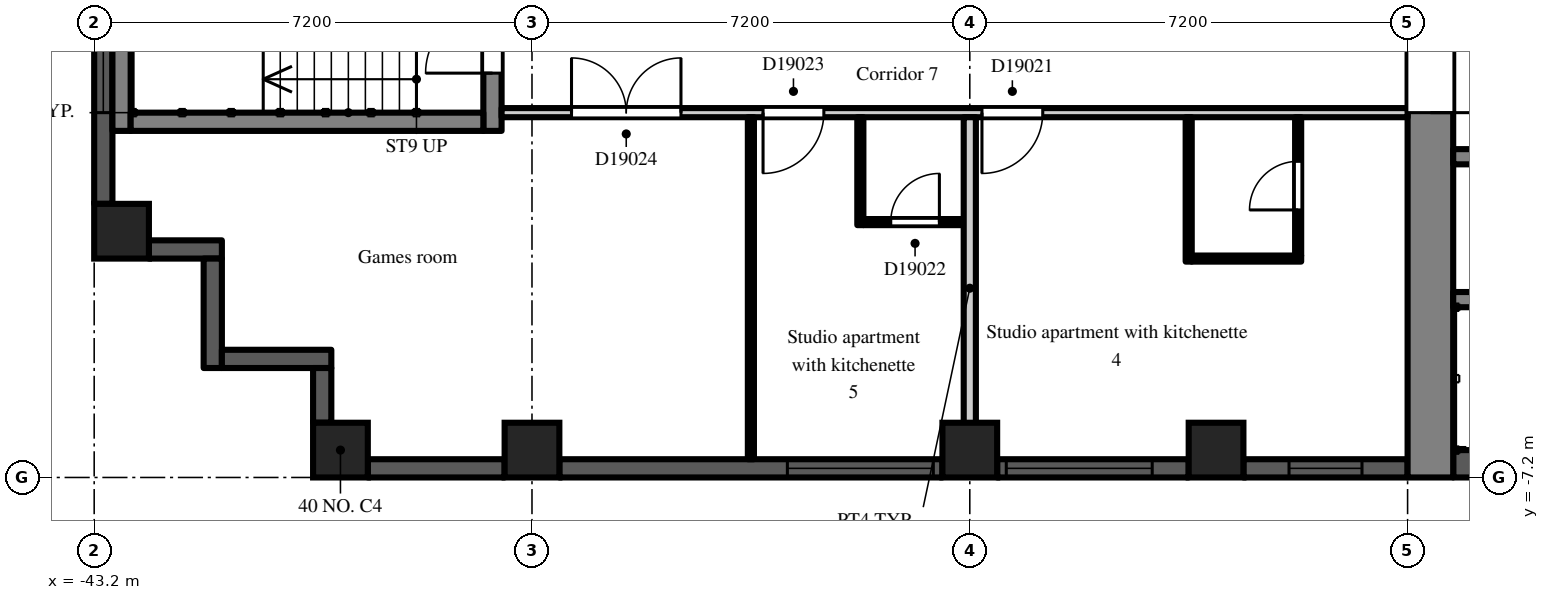
"""IFC4 building model, lengths in metres.
Left out: names, types, materials, properties, quantities, classifications, styles, units other than length and angle.
Written with IfcOpenShell. Run it as: python <this file> out.ifc"""

import sys

from ifc_helpers import new_model, si_unit, direction, frame, frame_2d, origin, origin_2d, place, context, subcontext, project, spatial, rectangle, extrude, element, fill, save


model = new_model("IFC4")
c1 = context("Model", 3, precision=1e-05, world=origin(), true_north=direction((0.0, 1.0)))
c2 = subcontext(c1, "Body", "Model", "MODEL_VIEW")
j1 = project(units=[si_unit("LENGTHUNIT", "METRE"), si_unit("PLANEANGLEUNIT", "RADIAN")], contexts=[c1])
p1 = place(None, origin())
s1 = spatial("IfcSite", under=j1, at=p1, CompositionType="ELEMENT")
p2 = place(p1, origin())
s2 = spatial("IfcBuilding", under=s1, at=p2, CompositionType="ELEMENT")
p3 = place(p2, frame((0.0, 0.0, 129.3)))
s3 = spatial("IfcBuildingStorey", under=s2, at=p3, CompositionType="ELEMENT", Elevation=129.3)
for number, where, z_axis, x_axis in (
    (1, (-42.75, -3.15, 0.0), (0.0, 0.0, 1.0), (1.0, 0.0, 0.0)),
    (2, (-39.15, -6.75, 0.0), (0.0, 0.0, 1.0), (1.0, 0.0, 0.0)),
    (3, (-36.0, -6.75, 0.0), (0.0, 0.0, 1.0), (1.0, 0.0, 0.0)),
    (4, (-28.8, -6.75, 0.0), (0.0, 0.0, 1.0), (1.0, 0.0, 0.0)),
    (5, (-24.75, -6.75, 0.0), (0.0, 0.0, 1.0), (1.0, 0.0, 0.0)),
):
    element("IfcColumn", number, at=place(p3, frame(where, z_axis=z_axis, x_axis=x_axis)), inside=s3, PredefinedType="COLUMN", context=c2, shape_type="SweptSolid", body=[
        extrude(rectangle(XDim=0.9, YDim=0.9, at=origin_2d()), origin(), (0.0, 0.0, 1.0), 3.0),
    ])
p4 = place(p3, frame((-43.05, 2.7, 0.0), z_axis=(0.0, 0.0, 1.0), x_axis=(0.0, -1.0, 0.0)))
e6 = element("IfcWall", 6, at=p4, inside=s3, PredefinedType="SOLIDWALL", context=c2, shape_type="SweptSolid", body=[
    extrude(rectangle(XDim=5.4, YDim=0.3, at=frame_2d((2.7, 0.0))), origin(), (0.0, 0.0, 1.0), 2.2),
])
p5 = place(p4, frame((1.5, 0.0, 0.2)))
e7 = element("IfcOpeningElement", 7, at=p5, cuts=e6, PredefinedType="OPENING", context=c2, shape_type="SweptSolid", body=[
    extrude(rectangle(XDim=2.4, YDim=1.85, at=frame_2d((1.2, 0.925))), frame((0.0, 0.16, 0.0), z_axis=(0.0, -1.0, 0.0), x_axis=(1.0, 0.0, 0.0)), (0.0, 0.0, 1.0), 0.32),
])
p6 = place(p4, frame((0.15, 0.0, 0.2)))
e8 = element("IfcOpeningElement", 8, at=p6, cuts=e6, PredefinedType="OPENING", context=c2, shape_type="SweptSolid", body=[
    extrude(rectangle(XDim=1.2, YDim=1.85, at=frame_2d((0.6, 0.925))), frame((0.0, 0.16, 0.0), z_axis=(0.0, -1.0, 0.0), x_axis=(1.0, 0.0, 0.0)), (0.0, 0.0, 1.0), 0.32),
])
p7 = place(p3, frame((-42.3, -3.45, 0.0), z_axis=(0.0, 0.0, 1.0), x_axis=(1.0, 0.0, 0.0)))
e9 = element("IfcWall", 9, at=p7, inside=s3, PredefinedType="SOLIDWALL", context=c2, shape_type="SweptSolid", body=[
    extrude(rectangle(XDim=1.2, YDim=0.3, at=frame_2d((0.6, 0.0))), origin(), (0.0, 0.0, 1.0), 2.6),
])
p8 = place(p3, frame((-41.25, -3.6, 0.0), z_axis=(0.0, 0.0, 1.0), x_axis=(0.0, -1.0, 0.0)))
e10 = element("IfcWall", 10, at=p8, inside=s3, PredefinedType="SOLIDWALL", context=c2, shape_type="SweptSolid", body=[
    extrude(rectangle(XDim=1.8, YDim=0.3, at=frame_2d((0.9, 0.0))), origin(), (0.0, 0.0, 1.0), 2.6),
])
p9 = place(p3, frame((-41.1, -5.25, 0.0), z_axis=(0.0, 0.0, 1.0), x_axis=(1.0, 0.0, 0.0)))
e11 = element("IfcWall", 11, at=p9, inside=s3, PredefinedType="SOLIDWALL", context=c2, shape_type="SweptSolid", body=[
    extrude(rectangle(XDim=1.8, YDim=0.3, at=frame_2d((0.9, 0.0))), origin(), (0.0, 0.0, 1.0), 2.6),
])
p10 = place(p3, frame((-39.45, -5.4, 0.0), z_axis=(0.0, 0.0, 1.0), x_axis=(0.0, -1.0, 0.0)))
e12 = element("IfcWall", 12, at=p10, inside=s3, PredefinedType="SOLIDWALL", context=c2, shape_type="SweptSolid", body=[
    extrude(rectangle(XDim=0.9, YDim=0.3, at=frame_2d((0.45, 0.0))), origin(), (0.0, 0.0, 1.0), 2.6),
])
p11 = place(p3, frame((-38.7, -7.05, 0.0), z_axis=(0.0, 0.0, 1.0), x_axis=(1.0, 0.0, 0.0)))
e13 = element("IfcWall", 13, at=p11, inside=s3, PredefinedType="SOLIDWALL", context=c2, shape_type="SweptSolid", body=[
    extrude(rectangle(XDim=2.25, YDim=0.3, at=frame_2d((1.125, 0.0))), origin(), (0.0, 0.0, 1.0), 2.2),
])
p12 = place(p3, frame((-35.55, -7.05, 0.0), z_axis=(0.0, 0.0, 1.0), x_axis=(1.0, 0.0, 0.0)))
e14 = element("IfcWall", 14, at=p12, inside=s3, PredefinedType="SOLIDWALL", context=c2, shape_type="SweptSolid", body=[
    extrude(rectangle(XDim=6.3, YDim=0.3, at=frame_2d((3.15, 0.0))), origin(), (0.0, 0.0, 1.0), 2.2),
])
p13 = place(p12, frame((3.75, 0.0, 0.2)))
e15 = element("IfcOpeningElement", 15, at=p13, cuts=e14, PredefinedType="OPENING", context=c2, shape_type="SweptSolid", body=[
    extrude(rectangle(XDim=2.4, YDim=1.85, at=frame_2d((1.2, 0.925))), frame((0.0, 0.16, 0.0), z_axis=(0.0, -1.0, 0.0), x_axis=(1.0, 0.0, 0.0)), (0.0, 0.0, 1.0), 0.32),
])
p14 = place(p3, frame((-28.35, -7.05, 0.0), z_axis=(0.0, 0.0, 1.0), x_axis=(1.0, 0.0, 0.0)))
e16 = element("IfcWall", 16, at=p14, inside=s3, PredefinedType="SOLIDWALL", context=c2, shape_type="SweptSolid", body=[
    extrude(rectangle(XDim=3.15, YDim=0.3, at=frame_2d((1.575, 0.0))), origin(), (0.0, 0.0, 1.0), 2.2),
])
p15 = place(p14, frame((0.15, 0.0, 0.2)))
e17 = element("IfcOpeningElement", 17, at=p15, cuts=e16, PredefinedType="OPENING", context=c2, shape_type="SweptSolid", body=[
    extrude(rectangle(XDim=2.4, YDim=1.85, at=frame_2d((1.2, 0.925))), frame((0.0, 0.16, 0.0), z_axis=(0.0, -1.0, 0.0), x_axis=(1.0, 0.0, 0.0)), (0.0, 0.0, 1.0), 0.32),
])
p16 = place(p3, frame((-24.3, -7.05, 0.0), z_axis=(0.0, 0.0, 1.0), x_axis=(1.0, 0.0, 0.0)))
e18 = element("IfcWall", 18, at=p16, inside=s3, PredefinedType="SOLIDWALL", context=c2, shape_type="SweptSolid", body=[
    extrude(rectangle(XDim=2.7, YDim=0.3, at=frame_2d((1.35, 0.0))), origin(), (0.0, 0.0, 1.0), 2.2),
])
p17 = place(p16, frame((0.75, 0.0, 0.2)))
e19 = element("IfcOpeningElement", 19, at=p17, cuts=e18, PredefinedType="OPENING", context=c2, shape_type="SweptSolid", body=[
    extrude(rectangle(XDim=1.2, YDim=1.85, at=frame_2d((0.6, 0.925))), frame((0.0, 0.16, 0.0), z_axis=(0.0, -1.0, 0.0), x_axis=(1.0, 0.0, 0.0)), (0.0, 0.0, 1.0), 0.32),
])
p18 = place(p3, frame((-21.225, -7.2, 0.0), z_axis=(0.0, 0.0, 1.0), x_axis=(0.0, 1.0, 0.0)))
e20 = element("IfcWall", 20, at=p18, inside=s3, PredefinedType="SHEAR", context=c2, shape_type="SweptSolid", body=[
    extrude(rectangle(XDim=14.4, YDim=0.75, at=frame_2d((7.2, 0.0))), origin(), (0.0, 0.0, 1.0), 2.6),
])
p19 = place(p18, frame((6.0, 0.0, 0.0)))
e21 = element("IfcOpeningElement", 21, at=p19, cuts=e20, PredefinedType="OPENING", context=c2, shape_type="SweptSolid", body=[
    extrude(rectangle(XDim=2.4, YDim=2.2, at=frame_2d((1.2, 1.1))), frame((0.0, 0.385, 0.0), z_axis=(0.0, -1.0, 0.0), x_axis=(1.0, 0.0, 0.0)), (0.0, 0.0, 1.0), 0.77),
])
p20 = place(p3, frame((-7.9, -6.975, 0.0), z_axis=(0.0, 0.0, 1.0), x_axis=(-1.0, 0.0, 0.0)))
e22 = element("IfcWall", 22, at=p20, inside=s3, PredefinedType="SHEAR", context=c2, shape_type="SweptSolid", body=[
    extrude(rectangle(XDim=12.95, YDim=0.45, at=frame_2d((6.475, 0.0))), origin(), (0.0, 0.0, 1.0), 2.6),
])
p21 = place(p3, frame((-7.9, -1.925, 0.0), z_axis=(0.0, 0.0, 1.0), x_axis=(-1.0, 0.0, 0.0)))
e23 = element("IfcWall", 23, at=p21, inside=s3, PredefinedType="SHEAR", context=c2, shape_type="SweptSolid", body=[
    extrude(rectangle(XDim=12.95, YDim=0.25, at=frame_2d((6.475, 0.0))), origin(), (0.0, 0.0, 1.0), 2.6),
])
p22 = place(p21, frame((0.525, 0.0, 0.0)))
e24 = element("IfcOpeningElement", 24, at=p22, cuts=e23, PredefinedType="OPENING", context=c2, shape_type="SweptSolid", body=[
    extrude(rectangle(XDim=0.9, YDim=2.1, at=frame_2d((0.45, 1.05))), frame((0.0, 0.135, 0.0), z_axis=(0.0, -1.0, 0.0), x_axis=(1.0, 0.0, 0.0)), (0.0, 0.0, 1.0), 0.27),
])
p23 = place(p21, frame((2.625, 0.0, 0.0)))
e25 = element("IfcOpeningElement", 25, at=p23, cuts=e23, PredefinedType="OPENING", context=c2, shape_type="SweptSolid", body=[
    extrude(rectangle(XDim=1.1, YDim=2.1, at=frame_2d((0.55, 1.05))), frame((0.0, 0.135, 0.0), z_axis=(0.0, -1.0, 0.0), x_axis=(1.0, 0.0, 0.0)), (0.0, 0.0, 1.0), 0.27),
])
p24 = place(p21, frame((8.225, 0.0, 0.0)))
e26 = element("IfcOpeningElement", 26, at=p24, cuts=e23, PredefinedType="OPENING", context=c2, shape_type="SweptSolid", body=[
    extrude(rectangle(XDim=0.9, YDim=2.1, at=frame_2d((0.45, 1.05))), frame((0.0, 0.135, 0.0), z_axis=(0.0, -1.0, 0.0), x_axis=(1.0, 0.0, 0.0)), (0.0, 0.0, 1.0), 0.27),
])
p25 = place(p3, frame((-12.3, -4.275, 0.0), z_axis=(0.0, 0.0, 1.0), x_axis=(-1.0, 0.0, 0.0)))
e27 = element("IfcWall", 27, at=p25, inside=s3, PredefinedType="SHEAR", context=c2, shape_type="SweptSolid", body=[
    extrude(rectangle(XDim=8.55, YDim=0.25, at=frame_2d((4.275, 0.0))), origin(), (0.0, 0.0, 1.0), 2.6),
])
p26 = place(p3, frame((-36.65, -1.5, 0.0), z_axis=(0.0, 0.0, 1.0), x_axis=(0.0, 1.0, 0.0)))
e28 = element("IfcWall", 28, at=p26, inside=s3, PredefinedType="SHEAR", context=c2, shape_type="SweptSolid", body=[
    extrude(rectangle(XDim=3.0, YDim=0.3, at=frame_2d((1.5, 0.0))), origin(), (0.0, 0.0, 1.0), 2.6),
])
p27 = place(p26, frame((0.95, 0.0, 0.0)))
e29 = element("IfcOpeningElement", 29, at=p27, cuts=e28, PredefinedType="OPENING", context=c2, shape_type="SweptSolid", body=[
    extrude(rectangle(XDim=1.1, YDim=2.1, at=frame_2d((0.55, 1.05))), frame((0.0, 0.16, 0.0), z_axis=(0.0, -1.0, 0.0), x_axis=(1.0, 0.0, 0.0)), (0.0, 0.0, 1.0), 0.32),
])
p28 = place(p3, frame((-42.75, -1.5, 0.0), z_axis=(0.0, 0.0, 1.0), x_axis=(0.0, 1.0, 0.0)))
e30 = element("IfcWall", 30, at=p28, inside=s3, PredefinedType="SHEAR", context=c2, shape_type="SweptSolid", body=[
    extrude(rectangle(XDim=3.0, YDim=0.3, at=frame_2d((1.5, 0.0))), origin(), (0.0, 0.0, 1.0), 2.6),
])
p29 = place(p3, frame((-36.8, -1.35, 0.0), z_axis=(0.0, 0.0, 1.0), x_axis=(-1.0, 0.0, 0.0)))
e31 = element("IfcWall", 31, at=p29, inside=s3, PredefinedType="SHEAR", context=c2, shape_type="SweptSolid", body=[
    extrude(rectangle(XDim=5.8, YDim=0.3, at=frame_2d((2.9, 0.0))), origin(), (0.0, 0.0, 1.0), 2.6),
])
p30 = place(p3, frame((-36.5, -1.2, 0.0), z_axis=(0.0, 0.0, 1.0), x_axis=(1.0, 0.0, 0.0)))
e32 = element("IfcWall", 32, at=p30, inside=s3, PredefinedType="PARTITIONING", context=c2, shape_type="SweptSolid", body=[
    extrude(rectangle(XDim=14.9, YDim=0.15, at=frame_2d((7.45, 0.0))), origin(), (0.0, 0.0, 1.0), 2.6),
])
p31 = place(p30, frame((7.9, 0.0, 0.0)))
e33 = element("IfcOpeningElement", 33, at=p31, cuts=e32, PredefinedType="OPENING", context=c2, shape_type="SweptSolid", body=[
    extrude(rectangle(XDim=1.0, YDim=2.1, at=frame_2d((0.5, 1.05))), frame((0.0, 0.085, 0.0), z_axis=(0.0, -1.0, 0.0), x_axis=(1.0, 0.0, 0.0)), (0.0, 0.0, 1.0), 0.17),
])
p32 = place(p30, frame((4.3, 0.0, 0.0)))
e34 = element("IfcOpeningElement", 34, at=p32, cuts=e32, PredefinedType="OPENING", context=c2, shape_type="SweptSolid", body=[
    extrude(rectangle(XDim=1.0, YDim=2.1, at=frame_2d((0.5, 1.05))), frame((0.0, 0.085, 0.0), z_axis=(0.0, -1.0, 0.0), x_axis=(1.0, 0.0, 0.0)), (0.0, 0.0, 1.0), 0.17),
])
p33 = place(p30, frame((1.15, 0.0, 0.0)))
e35 = element("IfcOpeningElement", 35, at=p33, cuts=e32, PredefinedType="OPENING", context=c2, shape_type="SweptSolid", body=[
    extrude(rectangle(XDim=1.8, YDim=2.1, at=frame_2d((0.9, 1.05))), frame((0.0, 0.085, 0.0), z_axis=(0.0, -1.0, 0.0), x_axis=(1.0, 0.0, 0.0)), (0.0, 0.0, 1.0), 0.17),
])
p34 = place(p3, frame((-32.4, -6.9, 0.0), z_axis=(0.0, 0.0, 1.0), x_axis=(0.0, 1.0, 0.0)))
e36 = element("IfcWall", 36, at=p34, inside=s3, PredefinedType="PARTITIONING", context=c2, shape_type="SweptSolid", body=[
    extrude(rectangle(XDim=5.625, YDim=0.1, at=frame_2d((2.812, 0.0))), origin(), (0.0, 0.0, 1.0), 2.6),
])
p35 = place(p3, frame((-30.6, -3.05, 0.0), z_axis=(0.0, 0.0, 1.0), x_axis=(0.0, 1.0, 0.0)))
e37 = element("IfcWall", 37, at=p35, inside=s3, PredefinedType="PARTITIONING", context=c2, shape_type="SweptSolid", body=[
    extrude(rectangle(XDim=1.775, YDim=0.1, at=frame_2d((0.888, 0.0))), origin(), (0.0, 0.0, 1.0), 2.6),
])
p36 = place(p3, frame((-30.55, -3.0, 0.0), z_axis=(0.0, 0.0, 1.0), x_axis=(1.0, 0.0, 0.0)))
e38 = element("IfcWall", 38, at=p36, inside=s3, PredefinedType="PARTITIONING", context=c2, shape_type="SweptSolid", body=[
    extrude(rectangle(XDim=1.65, YDim=0.1, at=frame_2d((0.825, 0.0))), origin(), (0.0, 0.0, 1.0), 2.6),
])
p37 = place(p36, frame((0.45, 0.0, 0.0)))
e39 = element("IfcOpeningElement", 39, at=p37, cuts=e38, PredefinedType="OPENING", context=c2, shape_type="SweptSolid", body=[
    extrude(rectangle(XDim=0.8, YDim=2.1, at=frame_2d((0.4, 1.05))), frame((0.0, 0.06, 0.0), z_axis=(0.0, -1.0, 0.0), x_axis=(1.0, 0.0, 0.0)), (0.0, 0.0, 1.0), 0.12),
])
p38 = place(p3, frame((-28.8, -6.9, 0.0), z_axis=(0.0, 0.0, 1.0), x_axis=(0.0, 1.0, 0.0)))
e40 = element("IfcWall", 40, at=p38, inside=s3, PredefinedType="PARTITIONING", context=c2, shape_type="SweptSolid", body=[
    extrude(rectangle(XDim=5.625, YDim=0.2, at=frame_2d((2.812, 0.0))), origin(), (0.0, 0.0, 1.0), 2.6),
])
p39 = place(p3, frame((-25.2, -3.65, 0.0), z_axis=(0.0, 0.0, 1.0), x_axis=(0.0, 1.0, 0.0)))
e41 = element("IfcWall", 41, at=p39, inside=s3, PredefinedType="PARTITIONING", context=c2, shape_type="SweptSolid", body=[
    extrude(rectangle(XDim=2.375, YDim=0.1, at=frame_2d((1.188, 0.0))), origin(), (0.0, 0.0, 1.0), 2.6),
])
p40 = place(p3, frame((-25.15, -3.6, 0.0), z_axis=(0.0, 0.0, 1.0), x_axis=(1.0, 0.0, 0.0)))
e42 = element("IfcWall", 42, at=p40, inside=s3, PredefinedType="PARTITIONING", context=c2, shape_type="SweptSolid", body=[
    extrude(rectangle(XDim=1.8, YDim=0.1, at=frame_2d((0.9, 0.0))), origin(), (0.0, 0.0, 1.0), 2.6),
])
p41 = place(p3, frame((-23.4, -3.55, 0.0), z_axis=(0.0, 0.0, 1.0), x_axis=(0.0, 1.0, 0.0)))
e43 = element("IfcWall", 43, at=p41, inside=s3, PredefinedType="PARTITIONING", context=c2, shape_type="SweptSolid", body=[
    extrude(rectangle(XDim=2.275, YDim=0.1, at=frame_2d((1.138, 0.0))), origin(), (0.0, 0.0, 1.0), 2.6),
])
p42 = place(p41, frame((0.75, 0.0, 0.0)))
e44 = element("IfcOpeningElement", 44, at=p42, cuts=e43, PredefinedType="OPENING", context=c2, shape_type="SweptSolid", body=[
    extrude(rectangle(XDim=0.8, YDim=2.1, at=frame_2d((0.4, 1.05))), frame((0.0, 0.06, 0.0), z_axis=(0.0, -1.0, 0.0), x_axis=(1.0, 0.0, 0.0)), (0.0, 0.0, 1.0), 0.12),
])
p43 = place(p5, origin())
e45 = element("IfcWindow", 45, at=p43, inside=s3, PartitioningType="SINGLE_PANEL", PredefinedType="WINDOW", context=c2, shape_type="SweptSolid", body=[
    extrude(rectangle(XDim=2.4, YDim=1.85, at=frame_2d((1.2, 0.925))), frame((0.0, 0.03, 0.0), z_axis=(0.0, -1.0, 0.0), x_axis=(1.0, 0.0, 0.0)), (0.0, 0.0, 1.0), 0.06),
])
fill(e7, e45)
p44 = place(p13, origin())
e46 = element("IfcWindow", 46, at=p44, inside=s3, PartitioningType="SINGLE_PANEL", PredefinedType="WINDOW", context=c2, shape_type="SweptSolid", body=[
    extrude(rectangle(XDim=2.4, YDim=1.85, at=frame_2d((1.2, 0.925))), frame((0.0, 0.03, 0.0), z_axis=(0.0, -1.0, 0.0), x_axis=(1.0, 0.0, 0.0)), (0.0, 0.0, 1.0), 0.06),
])
fill(e15, e46)
p45 = place(p15, origin())
e47 = element("IfcWindow", 47, at=p45, inside=s3, PartitioningType="SINGLE_PANEL", PredefinedType="WINDOW", context=c2, shape_type="SweptSolid", body=[
    extrude(rectangle(XDim=2.4, YDim=1.85, at=frame_2d((1.2, 0.925))), frame((0.0, 0.03, 0.0), z_axis=(0.0, -1.0, 0.0), x_axis=(1.0, 0.0, 0.0)), (0.0, 0.0, 1.0), 0.06),
])
fill(e17, e47)
p46 = place(p17, origin())
e48 = element("IfcWindow", 48, at=p46, inside=s3, PartitioningType="SINGLE_PANEL", PredefinedType="WINDOW", context=c2, shape_type="SweptSolid", body=[
    extrude(rectangle(XDim=1.2, YDim=1.85, at=frame_2d((0.6, 0.925))), frame((0.0, 0.03, 0.0), z_axis=(0.0, -1.0, 0.0), x_axis=(1.0, 0.0, 0.0)), (0.0, 0.0, 1.0), 0.06),
])
fill(e19, e48)
p47 = place(p19, frame((2.4, 0.0, 0.0), z_axis=(0.0, 0.0, 1.0), x_axis=(-1.0, 0.0, 0.0)))
e49 = element("IfcDoor", 49, at=p47, inside=s3, OperationType="DOUBLE_DOOR_DOUBLE_SWING", PredefinedType="DOOR", context=c2, shape_type="SweptSolid", body=[
    extrude(rectangle(XDim=2.4, YDim=2.2, at=frame_2d((1.2, 1.1))), frame((0.0, 0.025, 0.0), z_axis=(0.0, -1.0, 0.0), x_axis=(1.0, 0.0, 0.0)), (0.0, 0.0, 1.0), 0.05),
])
fill(e21, e49)
p48 = place(p27, origin())
e50 = element("IfcDoor", 50, at=p48, inside=s3, OperationType="SINGLE_SWING_LEFT", PredefinedType="DOOR", context=c2, shape_type="SweptSolid", body=[
    extrude(rectangle(XDim=1.1, YDim=2.1, at=frame_2d((0.55, 1.05))), frame((0.0, 0.025, 0.0), z_axis=(0.0, -1.0, 0.0), x_axis=(1.0, 0.0, 0.0)), (0.0, 0.0, 1.0), 0.05),
])
fill(e29, e50)
p49 = place(p42, origin())
e51 = element("IfcDoor", 51, at=p49, inside=s3, OperationType="SINGLE_SWING_LEFT", PredefinedType="DOOR", context=c2, shape_type="SweptSolid", body=[
    extrude(rectangle(XDim=0.8, YDim=2.1, at=frame_2d((0.4, 1.05))), frame((0.0, 0.025, 0.0), z_axis=(0.0, -1.0, 0.0), x_axis=(1.0, 0.0, 0.0)), (0.0, 0.0, 1.0), 0.05),
])
fill(e44, e51)
p50 = place(p31, frame((1.0, 0.0, 0.0), z_axis=(0.0, 0.0, 1.0), x_axis=(-1.0, 0.0, 0.0)))
e52 = element("IfcDoor", 52, at=p50, inside=s3, OperationType="SINGLE_SWING_RIGHT", PredefinedType="DOOR", context=c2, shape_type="SweptSolid", body=[
    extrude(rectangle(XDim=1.0, YDim=2.1, at=frame_2d((0.5, 1.05))), frame((0.0, 0.025, 0.0), z_axis=(0.0, -1.0, 0.0), x_axis=(1.0, 0.0, 0.0)), (0.0, 0.0, 1.0), 0.05),
])
fill(e33, e52)
p51 = place(p37, origin())
e53 = element("IfcDoor", 53, at=p51, inside=s3, OperationType="SINGLE_SWING_RIGHT", PredefinedType="DOOR", context=c2, shape_type="SweptSolid", body=[
    extrude(rectangle(XDim=0.8, YDim=2.1, at=frame_2d((0.4, 1.05))), frame((0.0, 0.025, 0.0), z_axis=(0.0, -1.0, 0.0), x_axis=(1.0, 0.0, 0.0)), (0.0, 0.0, 1.0), 0.05),
])
fill(e39, e53)
p52 = place(p32, frame((1.0, 0.0, 0.0), z_axis=(0.0, 0.0, 1.0), x_axis=(-1.0, 0.0, 0.0)))
e54 = element("IfcDoor", 54, at=p52, inside=s3, OperationType="SINGLE_SWING_RIGHT", PredefinedType="DOOR", context=c2, shape_type="SweptSolid", body=[
    extrude(rectangle(XDim=1.0, YDim=2.1, at=frame_2d((0.5, 1.05))), frame((0.0, 0.025, 0.0), z_axis=(0.0, -1.0, 0.0), x_axis=(1.0, 0.0, 0.0)), (0.0, 0.0, 1.0), 0.05),
])
fill(e34, e54)
p53 = place(p33, origin())
e55 = element("IfcDoor", 55, at=p53, inside=s3, OperationType="DOUBLE_DOOR_DOUBLE_SWING", PredefinedType="DOOR", context=c2, shape_type="SweptSolid", body=[
    extrude(rectangle(XDim=1.8, YDim=2.1, at=frame_2d((0.9, 1.05))), frame((0.0, 0.025, 0.0), z_axis=(0.0, -1.0, 0.0), x_axis=(1.0, 0.0, 0.0)), (0.0, 0.0, 1.0), 0.05),
])
fill(e35, e55)
save(model, sys.argv[1])
